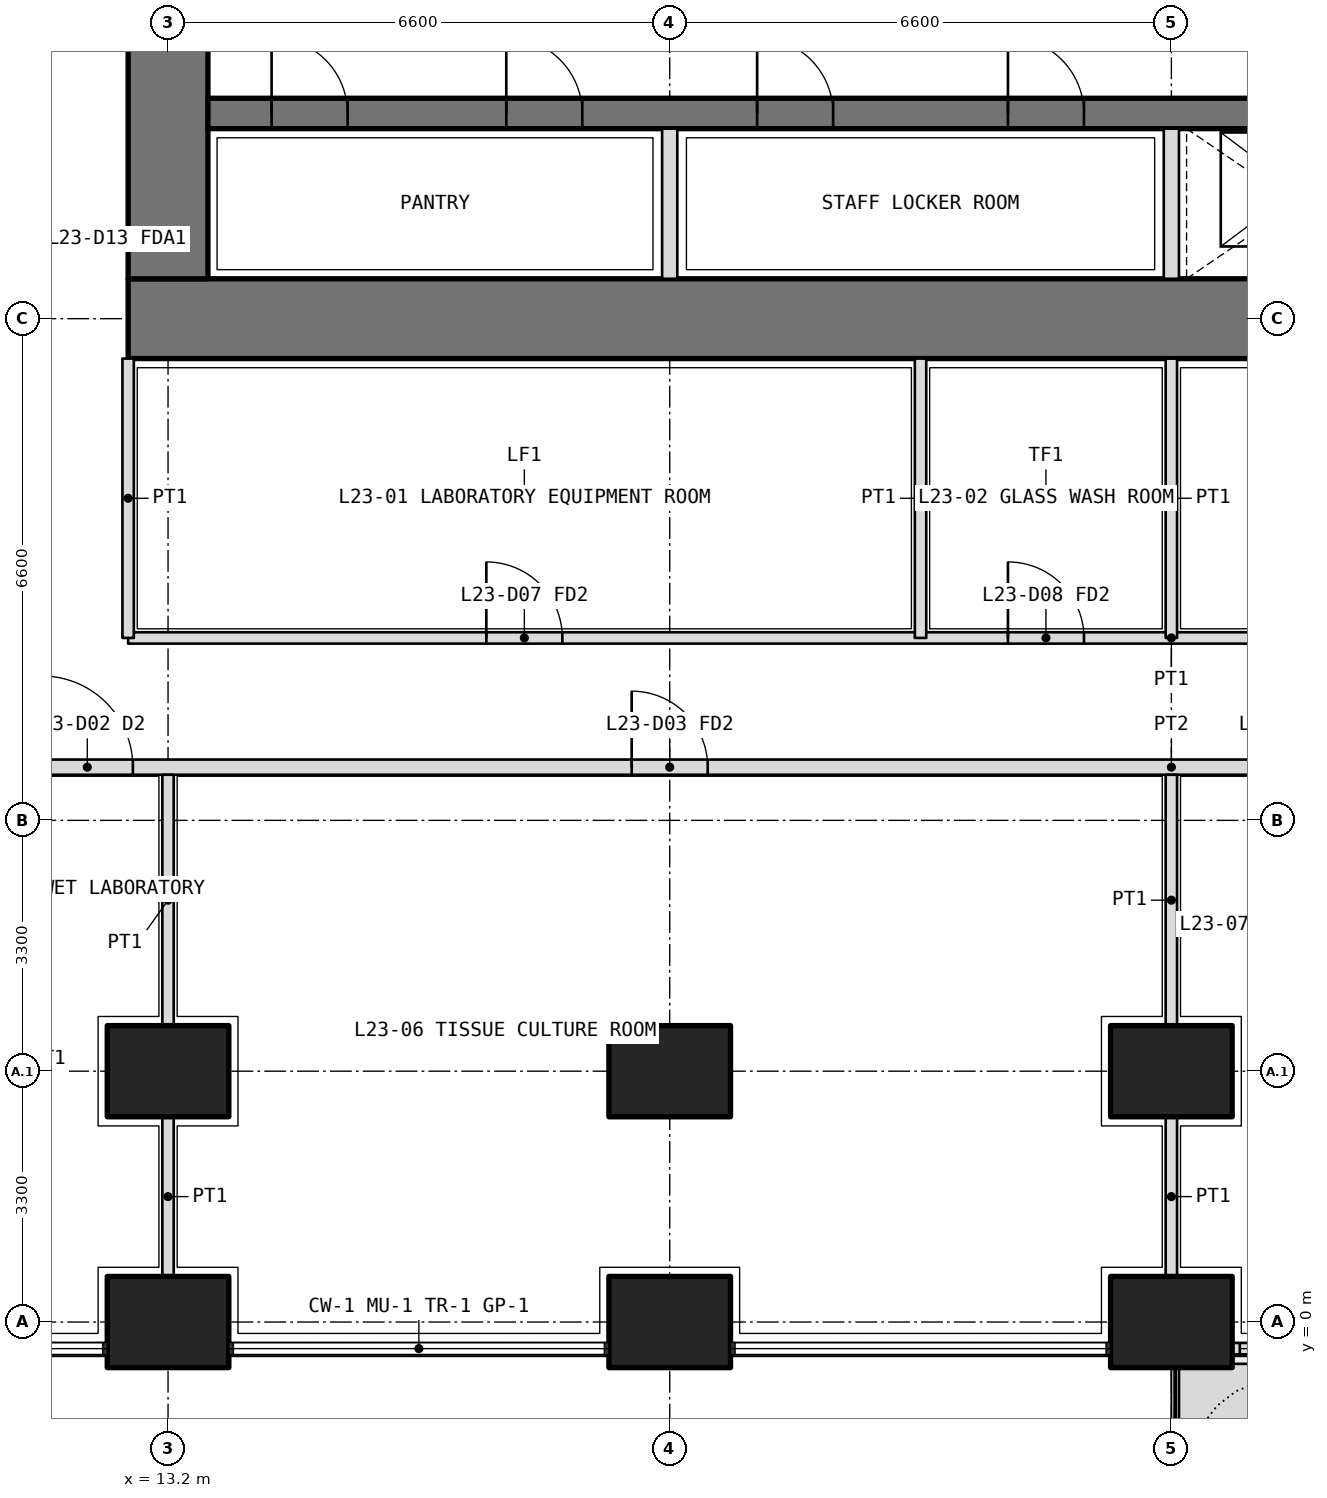
"""IFC4 building model, lengths in metres.
Left out: names, types, materials, properties, quantities, classifications, styles, units other than length and angle.
Written with IfcOpenShell. Run it as: python <this file> out.ifc"""

import sys

from ifc_helpers import new_model, si_unit, direction, frame, frame_2d, origin, origin_2d, place, context, subcontext, project, spatial, polyline, rectangle, outline, extrude, element, fill, save


model = new_model("IFC4")
c1 = context("Model", 3, precision=1e-05, world=origin(), true_north=direction((0.0, 1.0)))
c2 = subcontext(c1, "Body", "Model", "MODEL_VIEW")
j1 = project(units=[si_unit("LENGTHUNIT", "METRE"), si_unit("PLANEANGLEUNIT", "RADIAN")], contexts=[c1])
p1 = place(None, origin())
s1 = spatial("IfcSite", under=j1, at=p1, CompositionType="ELEMENT")
p2 = place(p1, origin())
s2 = spatial("IfcBuilding", under=s1, at=p2, CompositionType="ELEMENT")
p3 = place(p2, frame((0.0, 0.0, 103.2)))
s3 = spatial("IfcBuildingStorey", under=s2, at=p3, CompositionType="ELEMENT", Elevation=103.2)
for number, where, z_axis, x_axis in (
    (1, (13.2, 0.0, 0.0), (0.0, 0.0, 1.0), (1.0, 0.0, 0.0)),
    (2, (19.8, 0.0, 0.0), (0.0, 0.0, 1.0), (1.0, 0.0, 0.0)),
    (3, (26.4, 0.0, 0.0), (0.0, 0.0, 1.0), (1.0, 0.0, 0.0)),
    (4, (13.2, 3.3, 0.0), (0.0, 0.0, 1.0), (1.0, 0.0, 0.0)),
    (5, (19.8, 3.3, 0.0), (0.0, 0.0, 1.0), (1.0, 0.0, 0.0)),
    (6, (26.4, 3.3, 0.0), (0.0, 0.0, 1.0), (1.0, 0.0, 0.0)),
):
    element("IfcColumn", number, at=place(p3, frame(where, z_axis=z_axis, x_axis=x_axis)), inside=s3, PredefinedType="COLUMN", context=c2, shape_type="SweptSolid", body=[
        extrude(rectangle(XDim=1.6, YDim=1.2, at=origin_2d()), origin(), (0.0, 0.0, 1.0), 4.2),
    ])
p4 = place(p3, origin())
e7 = element("IfcWall", 7, at=p4, inside=s3, PredefinedType="USERDEFINED", context=c2, shape_type="SweptSolid", body=[
    extrude(outline(polyline([(26.5, -1.55), (28.95, -1.55), (28.95, -0.55), (26.5, -0.55), (26.5, -1.55)]), holes=[polyline([(26.65, -1.4), (28.8, -1.4), (28.8, -0.7), (26.65, -0.7), (26.65, -1.4)])]), origin(), (0.0, 0.0, 1.0), 1.05),
])
p5 = place(p3, frame((27.2, -0.35, 0.0), z_axis=(0.0, 0.0, 1.0), x_axis=(1.0, 0.0, 0.0)))
e8 = element("IfcWall", 8, at=p5, inside=s3, PredefinedType="SOLIDWALL", context=c2, shape_type="SweptSolid", body=[
    extrude(rectangle(XDim=5.0, YDim=0.15, at=frame_2d((2.5, 0.0))), origin(), (0.0, 0.0, 1.0), 2.7),
])
p6 = place(p5, frame((2.75, 0.0, 0.0)))
e9 = element("IfcOpeningElement", 9, at=p6, cuts=e8, PredefinedType="OPENING", context=c2, shape_type="SweptSolid", body=[
    extrude(rectangle(XDim=1.0, YDim=2.4, at=frame_2d((0.5, 1.2))), frame((0.0, 0.085, 0.0), z_axis=(0.0, -1.0, 0.0), x_axis=(1.0, 0.0, 0.0)), (0.0, 0.0, 1.0), 0.17),
])
p7 = place(p5, frame((0.1, 0.0, 0.1)))
e10 = element("IfcOpeningElement", 10, at=p7, cuts=e8, PredefinedType="OPENING", context=c2, shape_type="SweptSolid", body=[
    extrude(rectangle(XDim=2.15, YDim=2.3, at=frame_2d((1.075, 1.15))), frame((0.0, 0.085, 0.0), z_axis=(0.0, -1.0, 0.0), x_axis=(1.0, 0.0, 0.0)), (0.0, 0.0, 1.0), 0.17),
])
p8 = place(p5, frame((3.85, 0.0, 0.1)))
e11 = element("IfcOpeningElement", 11, at=p8, cuts=e8, PredefinedType="OPENING", context=c2, shape_type="SweptSolid", body=[
    extrude(rectangle(XDim=1.05, YDim=2.3, at=frame_2d((0.525, 1.15))), frame((0.0, 0.085, 0.0), z_axis=(0.0, -1.0, 0.0), x_axis=(1.0, 0.0, 0.0)), (0.0, 0.0, 1.0), 0.17),
])
p9 = place(p3, frame((12.675, 13.2, 0.0), z_axis=(0.0, 0.0, 1.0), x_axis=(1.0, 0.0, 0.0)))
e12 = element("IfcWall", 12, at=p9, inside=s3, PredefinedType="SHEAR", context=c2, shape_type="SweptSolid", body=[
    extrude(rectangle(XDim=27.45, YDim=1.05, at=frame_2d((13.725, 0.0))), origin(), (0.0, 0.0, 1.0), 4.2),
])
p10 = place(p3, frame((13.2, 32.475, 0.0), z_axis=(0.0, 0.0, 1.0), x_axis=(0.0, -1.0, 0.0)))
e13 = element("IfcWall", 13, at=p10, inside=s3, PredefinedType="SHEAR", context=c2, shape_type="SweptSolid", body=[
    extrude(rectangle(XDim=18.75, YDim=1.05, at=frame_2d((9.375, 0.0))), origin(), (0.0, 0.0, 1.0), 4.2),
])
p11 = place(p10, frame((14.125, 0.0, 0.0)))
e14 = element("IfcOpeningElement", 14, at=p11, cuts=e13, PredefinedType="OPENING", context=c2, shape_type="SweptSolid", body=[
    extrude(rectangle(XDim=1.6, YDim=2.1, at=frame_2d((0.8, 1.05))), frame((0.0, 0.535, 0.0), z_axis=(0.0, -1.0, 0.0), x_axis=(1.0, 0.0, 0.0)), (0.0, 0.0, 1.0), 1.07),
])
p12 = place(p10, frame((3.325, 0.0, 0.0)))
e15 = element("IfcOpeningElement", 15, at=p12, cuts=e13, PredefinedType="OPENING", context=c2, shape_type="SweptSolid", body=[
    extrude(rectangle(XDim=1.6, YDim=2.1, at=frame_2d((0.8, 1.05))), frame((0.0, 0.535, 0.0), z_axis=(0.0, -1.0, 0.0), x_axis=(1.0, 0.0, 0.0)), (0.0, 0.0, 1.0), 1.07),
])
p13 = place(p3, frame((13.725, 15.9, 0.0), z_axis=(0.0, 0.0, 1.0), x_axis=(1.0, 0.0, 0.0)))
e16 = element("IfcWall", 16, at=p13, inside=s3, PredefinedType="SHEAR", context=c2, shape_type="SweptSolid", body=[
    extrude(rectangle(XDim=25.35, YDim=0.4, at=frame_2d((12.675, 0.0))), origin(), (0.0, 0.0, 1.0), 4.2),
])
p14 = place(p13, frame((0.837, 0.0, 0.0)))
e17 = element("IfcOpeningElement", 17, at=p14, cuts=e16, PredefinedType="OPENING", context=c2, shape_type="SweptSolid", body=[
    extrude(rectangle(XDim=1.0, YDim=2.1, at=frame_2d((0.5, 1.05))), frame((0.0, 0.21, 0.0), z_axis=(0.0, -1.0, 0.0), x_axis=(1.0, 0.0, 0.0)), (0.0, 0.0, 1.0), 0.42),
])
p15 = place(p13, frame((3.925, 0.0, 0.0)))
e18 = element("IfcOpeningElement", 18, at=p15, cuts=e16, PredefinedType="OPENING", context=c2, shape_type="SweptSolid", body=[
    extrude(rectangle(XDim=1.0, YDim=2.1, at=frame_2d((0.5, 1.05))), frame((0.0, 0.21, 0.0), z_axis=(0.0, -1.0, 0.0), x_axis=(1.0, 0.0, 0.0)), (0.0, 0.0, 1.0), 0.42),
])
p16 = place(p13, frame((7.225, 0.0, 0.0)))
e19 = element("IfcOpeningElement", 19, at=p16, cuts=e16, PredefinedType="OPENING", context=c2, shape_type="SweptSolid", body=[
    extrude(rectangle(XDim=1.0, YDim=2.1, at=frame_2d((0.5, 1.05))), frame((0.0, 0.21, 0.0), z_axis=(0.0, -1.0, 0.0), x_axis=(1.0, 0.0, 0.0)), (0.0, 0.0, 1.0), 0.42),
])
p17 = place(p13, frame((10.525, 0.0, 0.0)))
e20 = element("IfcOpeningElement", 20, at=p17, cuts=e16, PredefinedType="OPENING", context=c2, shape_type="SweptSolid", body=[
    extrude(rectangle(XDim=1.0, YDim=2.1, at=frame_2d((0.5, 1.05))), frame((0.0, 0.21, 0.0), z_axis=(0.0, -1.0, 0.0), x_axis=(1.0, 0.0, 0.0)), (0.0, 0.0, 1.0), 0.42),
])
p18 = place(p13, frame((13.775, 0.0, 0.0)))
e21 = element("IfcOpeningElement", 21, at=p18, cuts=e16, PredefinedType="OPENING", context=c2, shape_type="SweptSolid", body=[
    extrude(rectangle(XDim=1.1, YDim=2.1, at=frame_2d((0.55, 1.05))), frame((0.0, 0.21, 0.0), z_axis=(0.0, -1.0, 0.0), x_axis=(1.0, 0.0, 0.0)), (0.0, 0.0, 1.0), 0.42),
])
p19 = place(p13, frame((17.075, 0.0, 0.0)))
e22 = element("IfcOpeningElement", 22, at=p19, cuts=e16, PredefinedType="OPENING", context=c2, shape_type="SweptSolid", body=[
    extrude(rectangle(XDim=1.1, YDim=2.1, at=frame_2d((0.55, 1.05))), frame((0.0, 0.21, 0.0), z_axis=(0.0, -1.0, 0.0), x_axis=(1.0, 0.0, 0.0)), (0.0, 0.0, 1.0), 0.42),
])
p20 = place(p13, frame((20.375, 0.0, 0.0)))
e23 = element("IfcOpeningElement", 23, at=p20, cuts=e16, PredefinedType="OPENING", context=c2, shape_type="SweptSolid", body=[
    extrude(rectangle(XDim=1.1, YDim=2.1, at=frame_2d((0.55, 1.05))), frame((0.0, 0.21, 0.0), z_axis=(0.0, -1.0, 0.0), x_axis=(1.0, 0.0, 0.0)), (0.0, 0.0, 1.0), 0.42),
])
p21 = place(p13, frame((23.462, 0.0, 0.0)))
e24 = element("IfcOpeningElement", 24, at=p21, cuts=e16, PredefinedType="OPENING", context=c2, shape_type="SweptSolid", body=[
    extrude(rectangle(XDim=1.1, YDim=2.1, at=frame_2d((0.55, 1.05))), frame((0.0, 0.21, 0.0), z_axis=(0.0, -1.0, 0.0), x_axis=(1.0, 0.0, 0.0)), (0.0, 0.0, 1.0), 0.42),
])
for number, where, z_axis, x_axis in (
    (25, (19.8, 13.725, 0.0), (0.0, 0.0, 1.0), (0.0, 1.0, 0.0)),
    (26, (26.4, 13.725, 0.0), (0.0, 0.0, 1.0), (0.0, 1.0, 0.0)),
):
    element("IfcWall", number, at=place(p3, frame(where, z_axis=z_axis, x_axis=x_axis)), inside=s3, PredefinedType="PARTITIONING", context=c2, shape_type="SweptSolid", body=[
        extrude(rectangle(XDim=1.975, YDim=0.2, at=frame_2d((0.987, 0.0))), origin(), (0.0, 0.0, 1.0), 4.2),
    ])
p22 = place(p3, frame((12.675, 9.0, 0.0), z_axis=(0.0, 0.0, 1.0), x_axis=(1.0, 0.0, 0.0)))
e27 = element("IfcWall", 27, at=p22, inside=s3, PredefinedType="PARTITIONING", context=c2, shape_type="SweptSolid", body=[
    extrude(rectangle(XDim=27.45, YDim=0.15, at=frame_2d((13.725, 0.0))), origin(), (0.0, 0.0, 1.0), 2.85),
])
p23 = place(p22, frame((4.712, 0.0, 0.0)))
e28 = element("IfcOpeningElement", 28, at=p23, cuts=e27, PredefinedType="OPENING", context=c2, shape_type="SweptSolid", body=[
    extrude(rectangle(XDim=1.0, YDim=2.1, at=frame_2d((0.5, 1.05))), frame((0.0, 0.085, 0.0), z_axis=(0.0, -1.0, 0.0), x_axis=(1.0, 0.0, 0.0)), (0.0, 0.0, 1.0), 0.17),
])
p24 = place(p22, frame((11.575, 0.0, 0.0)))
e29 = element("IfcOpeningElement", 29, at=p24, cuts=e27, PredefinedType="OPENING", context=c2, shape_type="SweptSolid", body=[
    extrude(rectangle(XDim=1.0, YDim=2.1, at=frame_2d((0.5, 1.05))), frame((0.0, 0.085, 0.0), z_axis=(0.0, -1.0, 0.0), x_axis=(1.0, 0.0, 0.0)), (0.0, 0.0, 1.0), 0.17),
])
p25 = place(p22, frame((18.175, 0.0, 0.0)))
e30 = element("IfcOpeningElement", 30, at=p25, cuts=e27, PredefinedType="OPENING", context=c2, shape_type="SweptSolid", body=[
    extrude(rectangle(XDim=1.0, YDim=2.1, at=frame_2d((0.5, 1.05))), frame((0.0, 0.085, 0.0), z_axis=(0.0, -1.0, 0.0), x_axis=(1.0, 0.0, 0.0)), (0.0, 0.0, 1.0), 0.17),
])
p26 = place(p22, frame((25.038, 0.0, 0.0)))
e31 = element("IfcOpeningElement", 31, at=p26, cuts=e27, PredefinedType="OPENING", context=c2, shape_type="SweptSolid", body=[
    extrude(rectangle(XDim=1.0, YDim=2.1, at=frame_2d((0.5, 1.05))), frame((0.0, 0.085, 0.0), z_axis=(0.0, -1.0, 0.0), x_axis=(1.0, 0.0, 0.0)), (0.0, 0.0, 1.0), 0.17),
])
p27 = place(p3, frame((12.675, 12.675, 0.0), z_axis=(0.0, 0.0, 1.0), x_axis=(0.0, -1.0, 0.0)))
e32 = element("IfcWall", 32, at=p27, inside=s3, PredefinedType="PARTITIONING", context=c2, shape_type="SweptSolid", body=[
    extrude(rectangle(XDim=3.675, YDim=0.15, at=frame_2d((1.837, 0.0))), origin(), (0.0, 0.0, 1.0), 2.85),
])
p28 = place(p3, frame((23.1, 12.675, 0.0), z_axis=(0.0, 0.0, 1.0), x_axis=(0.0, -1.0, 0.0)))
e33 = element("IfcWall", 33, at=p28, inside=s3, PredefinedType="PARTITIONING", context=c2, shape_type="SweptSolid", body=[
    extrude(rectangle(XDim=3.675, YDim=0.15, at=frame_2d((1.837, 0.0))), origin(), (0.0, 0.0, 1.0), 3.9),
])
p29 = place(p3, frame((26.4, 12.675, 0.0), z_axis=(0.0, 0.0, 1.0), x_axis=(0.0, -1.0, 0.0)))
e34 = element("IfcWall", 34, at=p29, inside=s3, PredefinedType="PARTITIONING", context=c2, shape_type="SweptSolid", body=[
    extrude(rectangle(XDim=3.675, YDim=0.15, at=frame_2d((1.837, 0.0))), origin(), (0.0, 0.0, 1.0), 2.85),
])
p30 = place(p3, frame((10.975, 7.3, 0.0), z_axis=(0.0, 0.0, 1.0), x_axis=(1.0, 0.0, 0.0)))
e35 = element("IfcWall", 35, at=p30, inside=s3, PredefinedType="PARTITIONING", context=c2, shape_type="SweptSolid", body=[
    extrude(rectangle(XDim=30.85, YDim=0.2, at=frame_2d((15.425, 0.0))), origin(), (0.0, 0.0, 1.0), 2.85),
])
p31 = place(p30, frame((0.562, 0.0, 0.0)))
e36 = element("IfcOpeningElement", 36, at=p31, cuts=e35, PredefinedType="OPENING", context=c2, shape_type="SweptSolid", body=[
    extrude(rectangle(XDim=1.2, YDim=2.1, at=frame_2d((0.6, 1.05))), frame((0.0, 0.11, 0.0), z_axis=(0.0, -1.0, 0.0), x_axis=(1.0, 0.0, 0.0)), (0.0, 0.0, 1.0), 0.22),
])
p32 = place(p30, frame((8.325, 0.0, 0.0)))
e37 = element("IfcOpeningElement", 37, at=p32, cuts=e35, PredefinedType="OPENING", context=c2, shape_type="SweptSolid", body=[
    extrude(rectangle(XDim=1.0, YDim=2.1, at=frame_2d((0.5, 1.05))), frame((0.0, 0.11, 0.0), z_axis=(0.0, -1.0, 0.0), x_axis=(1.0, 0.0, 0.0)), (0.0, 0.0, 1.0), 0.22),
])
p33 = place(p30, frame((16.475, 0.0, 0.0)))
e38 = element("IfcOpeningElement", 38, at=p33, cuts=e35, PredefinedType="OPENING", context=c2, shape_type="SweptSolid", body=[
    extrude(rectangle(XDim=1.2, YDim=2.1, at=frame_2d((0.6, 1.05))), frame((0.0, 0.11, 0.0), z_axis=(0.0, -1.0, 0.0), x_axis=(1.0, 0.0, 0.0)), (0.0, 0.0, 1.0), 0.22),
])
p34 = place(p30, frame((21.525, 0.0, 0.0)))
e39 = element("IfcOpeningElement", 39, at=p34, cuts=e35, PredefinedType="OPENING", context=c2, shape_type="SweptSolid", body=[
    extrude(rectangle(XDim=1.0, YDim=2.1, at=frame_2d((0.5, 1.05))), frame((0.0, 0.11, 0.0), z_axis=(0.0, -1.0, 0.0), x_axis=(1.0, 0.0, 0.0)), (0.0, 0.0, 1.0), 0.22),
])
p35 = place(p30, frame((27.538, 0.0, 0.0)))
e40 = element("IfcOpeningElement", 40, at=p35, cuts=e35, PredefinedType="OPENING", context=c2, shape_type="SweptSolid", body=[
    extrude(rectangle(XDim=1.0, YDim=2.1, at=frame_2d((0.5, 1.05))), frame((0.0, 0.11, 0.0), z_axis=(0.0, -1.0, 0.0), x_axis=(1.0, 0.0, 0.0)), (0.0, 0.0, 1.0), 0.22),
])
p36 = place(p3, frame((13.2, 0.6, 0.0), z_axis=(0.0, 0.0, 1.0), x_axis=(0.0, 1.0, 0.0)))
e41 = element("IfcWall", 41, at=p36, inside=s3, PredefinedType="PARTITIONING", context=c2, shape_type="SweptSolid", body=[
    extrude(rectangle(XDim=2.1, YDim=0.15, at=frame_2d((1.05, 0.0))), origin(), (0.0, 0.0, 1.0), 2.85),
])
p37 = place(p3, frame((13.2, 3.9, 0.0), z_axis=(0.0, 0.0, 1.0), x_axis=(0.0, 1.0, 0.0)))
e42 = element("IfcWall", 42, at=p37, inside=s3, PredefinedType="PARTITIONING", context=c2, shape_type="SweptSolid", body=[
    extrude(rectangle(XDim=3.3, YDim=0.15, at=frame_2d((1.65, 0.0))), origin(), (0.0, 0.0, 1.0), 2.85),
])
p38 = place(p3, frame((26.4, 0.6, 0.0), z_axis=(0.0, 0.0, 1.0), x_axis=(0.0, 1.0, 0.0)))
e43 = element("IfcWall", 43, at=p38, inside=s3, PredefinedType="PARTITIONING", context=c2, shape_type="SweptSolid", body=[
    extrude(rectangle(XDim=2.1, YDim=0.15, at=frame_2d((1.05, 0.0))), origin(), (0.0, 0.0, 1.0), 2.85),
])
p39 = place(p3, frame((26.4, 3.9, 0.0), z_axis=(0.0, 0.0, 1.0), x_axis=(0.0, 1.0, 0.0)))
e44 = element("IfcWall", 44, at=p39, inside=s3, PredefinedType="PARTITIONING", context=c2, shape_type="SweptSolid", body=[
    extrude(rectangle(XDim=3.3, YDim=0.15, at=frame_2d((1.65, 0.0))), origin(), (0.0, 0.0, 1.0), 2.85),
])
p40 = place(p7, origin())
e45 = element("IfcWindow", 45, at=p40, inside=s3, PartitioningType="SINGLE_PANEL", PredefinedType="WINDOW", context=c2, shape_type="SweptSolid", body=[
    extrude(rectangle(XDim=2.15, YDim=2.3, at=frame_2d((1.075, 1.15))), frame((0.0, 0.03, 0.0), z_axis=(0.0, -1.0, 0.0), x_axis=(1.0, 0.0, 0.0)), (0.0, 0.0, 1.0), 0.06),
])
fill(e10, e45)
p41 = place(p23, origin())
e46 = element("IfcDoor", 46, at=p41, inside=s3, OperationType="SINGLE_SWING_LEFT", PredefinedType="DOOR", context=c2, shape_type="SweptSolid", body=[
    extrude(rectangle(XDim=1.0, YDim=2.1, at=frame_2d((0.5, 1.05))), frame((0.0, 0.025, 0.0), z_axis=(0.0, -1.0, 0.0), x_axis=(1.0, 0.0, 0.0)), (0.0, 0.0, 1.0), 0.05),
])
fill(e28, e46)
p42 = place(p24, origin())
e47 = element("IfcDoor", 47, at=p42, inside=s3, OperationType="SINGLE_SWING_LEFT", PredefinedType="DOOR", context=c2, shape_type="SweptSolid", body=[
    extrude(rectangle(XDim=1.0, YDim=2.1, at=frame_2d((0.5, 1.05))), frame((0.0, 0.025, 0.0), z_axis=(0.0, -1.0, 0.0), x_axis=(1.0, 0.0, 0.0)), (0.0, 0.0, 1.0), 0.05),
])
fill(e29, e47)
p43 = place(p31, origin())
e48 = element("IfcDoor", 48, at=p43, inside=s3, OperationType="DOUBLE_DOOR_SINGLE_SWING", PredefinedType="DOOR", context=c2, shape_type="SweptSolid", body=[
    extrude(rectangle(XDim=1.2, YDim=2.1, at=frame_2d((0.6, 1.05))), frame((0.0, 0.025, 0.0), z_axis=(0.0, -1.0, 0.0), x_axis=(1.0, 0.0, 0.0)), (0.0, 0.0, 1.0), 0.05),
])
fill(e36, e48)
p44 = place(p32, origin())
e49 = element("IfcDoor", 49, at=p44, inside=s3, OperationType="SINGLE_SWING_LEFT", PredefinedType="DOOR", context=c2, shape_type="SweptSolid", body=[
    extrude(rectangle(XDim=1.0, YDim=2.1, at=frame_2d((0.5, 1.05))), frame((0.0, 0.025, 0.0), z_axis=(0.0, -1.0, 0.0), x_axis=(1.0, 0.0, 0.0)), (0.0, 0.0, 1.0), 0.05),
])
fill(e37, e49)
p45 = place(p14, origin())
e50 = element("IfcDoor", 50, at=p45, inside=s3, OperationType="SINGLE_SWING_LEFT", PredefinedType="DOOR", context=c2, shape_type="SweptSolid", body=[
    extrude(rectangle(XDim=1.0, YDim=2.1, at=frame_2d((0.5, 1.05))), frame((0.0, 0.025, 0.0), z_axis=(0.0, -1.0, 0.0), x_axis=(1.0, 0.0, 0.0)), (0.0, 0.0, 1.0), 0.05),
])
fill(e17, e50)
p46 = place(p15, origin())
e51 = element("IfcDoor", 51, at=p46, inside=s3, OperationType="SINGLE_SWING_LEFT", PredefinedType="DOOR", context=c2, shape_type="SweptSolid", body=[
    extrude(rectangle(XDim=1.0, YDim=2.1, at=frame_2d((0.5, 1.05))), frame((0.0, 0.025, 0.0), z_axis=(0.0, -1.0, 0.0), x_axis=(1.0, 0.0, 0.0)), (0.0, 0.0, 1.0), 0.05),
])
fill(e18, e51)
p47 = place(p16, origin())
e52 = element("IfcDoor", 52, at=p47, inside=s3, OperationType="SINGLE_SWING_LEFT", PredefinedType="DOOR", context=c2, shape_type="SweptSolid", body=[
    extrude(rectangle(XDim=1.0, YDim=2.1, at=frame_2d((0.5, 1.05))), frame((0.0, 0.025, 0.0), z_axis=(0.0, -1.0, 0.0), x_axis=(1.0, 0.0, 0.0)), (0.0, 0.0, 1.0), 0.05),
])
fill(e19, e52)
p48 = place(p17, origin())
e53 = element("IfcDoor", 53, at=p48, inside=s3, OperationType="SINGLE_SWING_LEFT", PredefinedType="DOOR", context=c2, shape_type="SweptSolid", body=[
    extrude(rectangle(XDim=1.0, YDim=2.1, at=frame_2d((0.5, 1.05))), frame((0.0, 0.025, 0.0), z_axis=(0.0, -1.0, 0.0), x_axis=(1.0, 0.0, 0.0)), (0.0, 0.0, 1.0), 0.05),
])
fill(e20, e53)
save(model, sys.argv[1])
